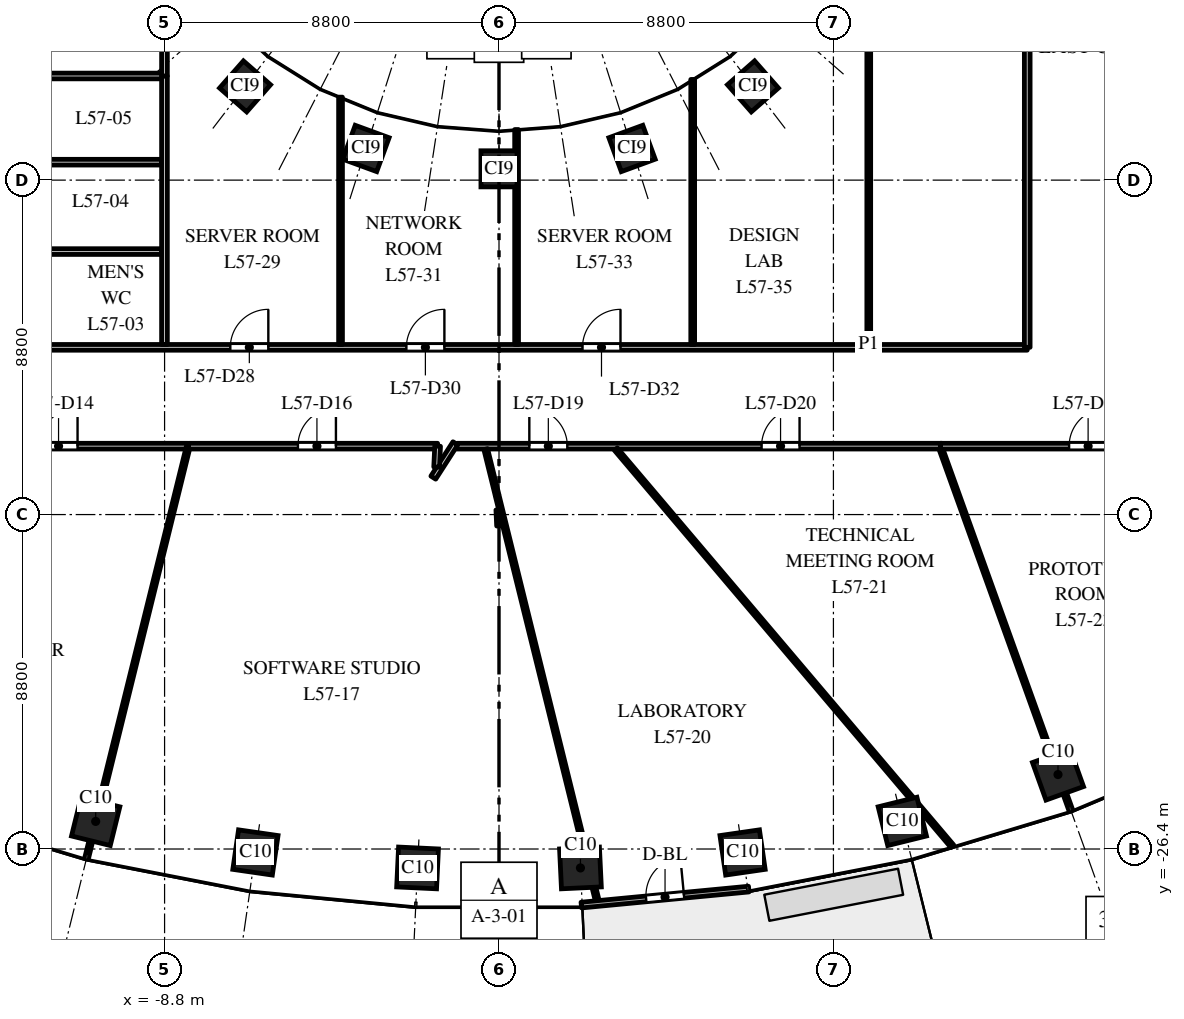
"""IFC4 building model, lengths in metres.
Left out: names, types, materials, properties, quantities, classifications, styles, units other than length and angle.
Written with IfcOpenShell. Run it as: python <this file> out.ifc"""

import sys

from ifc_helpers import new_model, si_unit, direction, frame, frame_2d, origin, origin_2d, place, context, subcontext, project, spatial, rectangle, extrude, element, fill, save


model = new_model("IFC4")
c1 = context("Model", 3, precision=1e-05, world=origin(), true_north=direction((0.0, 1.0)))
c2 = subcontext(c1, "Body", "Model", "MODEL_VIEW")
j1 = project(units=[si_unit("LENGTHUNIT", "METRE"), si_unit("PLANEANGLEUNIT", "RADIAN")], contexts=[c1])
p1 = place(None, origin())
s1 = spatial("IfcSite", under=j1, at=p1, CompositionType="ELEMENT")
p2 = place(p1, origin())
s2 = spatial("IfcBuilding", under=s1, at=p2, CompositionType="ELEMENT")
p3 = place(p2, frame((0.0, 0.0, 269.5)))
s3 = spatial("IfcBuildingStorey", under=s2, at=p3, CompositionType="ELEMENT", Elevation=269.5)
for number, where, z_axis, x_axis in (
    (1, (-10.613, -25.674, 0.0), (0.0, 0.0, 1.0), (0.971, -0.24, 0.0)),
    (2, (-6.409, -26.491, 0.0), (0.0, 0.0, 1.0), (0.99, -0.143, 0.0)),
    (3, (-2.143, -26.898, 0.0), (0.0, 0.0, 1.0), (0.999, -0.048, 0.0)),
    (4, (2.143, -26.898, 0.0), (0.0, 0.0, 1.0), (0.999, 0.048, 0.0)),
    (5, (6.409, -26.491, 0.0), (0.0, 0.0, 1.0), (0.99, 0.143, 0.0)),
    (6, (10.613, -25.674, 0.0), (0.0, 0.0, 1.0), (0.971, 0.24, 0.0)),
    (7, (14.709, -24.441, 0.0), (0.0, 0.0, 1.0), (0.941, 0.338, 0.0)),
):
    element("IfcColumn", number, at=place(p3, frame(where, z_axis=z_axis, x_axis=x_axis)), inside=s3, PredefinedType="COLUMN", context=c2, shape_type="SweptSolid", body=[
        extrude(rectangle(XDim=1.05, YDim=1.05, at=origin_2d()), origin(), (0.0, 0.0, 1.0), 4.0),
    ])
for number, where, z_axis, x_axis in (
    (8, (-6.682, -6.334, 0.0), (0.0, 0.0, 1.0), (0.751, -0.66, 0.0)),
    (9, (-3.501, -7.967, 0.0), (0.0, 0.0, 1.0), (0.939, -0.344, 0.0)),
    (10, (0.0, -8.503, 0.0), (0.0, 0.0, 1.0), (1.0, 0.0, 0.0)),
    (11, (3.501, -7.967, 0.0), (0.0, 0.0, 1.0), (0.939, 0.344, 0.0)),
    (12, (6.682, -6.334, 0.0), (0.0, 0.0, 1.0), (0.751, 0.66, 0.0)),
):
    element("IfcColumn", number, at=place(p3, frame(where, z_axis=z_axis, x_axis=x_axis)), inside=s3, PredefinedType="COLUMN", context=c2, shape_type="SweptSolid", body=[
        extrude(rectangle(XDim=0.95, YDim=0.95, at=origin_2d()), origin(), (0.0, 0.0, 1.0), 4.0),
    ])
p4 = place(p3, frame((2.166, -27.875, 0.0), z_axis=(0.0, 0.0, 1.0), x_axis=(0.995473879823, 0.095035543824, 0.0)))
e13 = element("IfcWall", 13, at=p4, inside=s3, PredefinedType="STANDARD", context=c2, shape_type="SweptSolid", body=[
    extrude(rectangle(XDim=4.426, YDim=0.15, at=frame_2d((2.213, 0.0))), origin(), (0.0, 0.0, 1.0), 3.7),
])
p5 = place(p4, frame((1.713, 0.0, 0.0)))
e14 = element("IfcOpeningElement", 14, at=p5, cuts=e13, PredefinedType="OPENING", context=c2, shape_type="SweptSolid", body=[
    extrude(rectangle(XDim=1.0, YDim=2.4, at=frame_2d((0.5, 1.2))), frame((0.0, 0.085, 0.0), z_axis=(0.0, -1.0, 0.0), x_axis=(1.0, 0.0, 0.0)), (0.0, 0.0, 1.0), 0.17),
])
p6 = place(p3, frame((-28.0, -15.8, 0.0), z_axis=(0.0, 0.0, 1.0), x_axis=(1.0, 0.0, 0.0)))
e15 = element("IfcWall", 15, at=p6, inside=s3, PredefinedType="PARTITIONING", context=c2, shape_type="SweptSolid", body=[
    extrude(rectangle(XDim=19.809, YDim=0.15, at=frame_2d((9.905, 0.0))), origin(), (0.0, 0.0, 1.0), 2.75),
])
p7 = place(p6, frame((7.878, 0.0, 0.0)))
e16 = element("IfcOpeningElement", 16, at=p7, cuts=e15, PredefinedType="OPENING", context=c2, shape_type="SweptSolid", body=[
    extrude(rectangle(XDim=1.0, YDim=2.1, at=frame_2d((0.5, 1.05))), frame((0.0, 0.085, 0.0), z_axis=(0.0, -1.0, 0.0), x_axis=(1.0, 0.0, 0.0)), (0.0, 0.0, 1.0), 0.17),
])
p8 = place(p6, frame((15.91, 0.0, 0.0)))
e17 = element("IfcOpeningElement", 17, at=p8, cuts=e15, PredefinedType="OPENING", context=c2, shape_type="SweptSolid", body=[
    extrude(rectangle(XDim=1.0, YDim=2.1, at=frame_2d((0.5, 1.05))), frame((0.0, 0.085, 0.0), z_axis=(0.0, -1.0, 0.0), x_axis=(1.0, 0.0, 0.0)), (0.0, 0.0, 1.0), 0.17),
])
p9 = place(p3, frame((-13.9, -13.2, 0.0), z_axis=(0.0, 0.0, 1.0), x_axis=(1.0, 0.0, 0.0)))
e18 = element("IfcWall", 18, at=p9, inside=s3, PredefinedType="PARTITIONING", context=c2, shape_type="SweptSolid", body=[
    extrude(rectangle(XDim=27.8, YDim=0.15, at=frame_2d((13.9, 0.0))), origin(), (0.0, 0.0, 1.0), 2.85),
])
p10 = place(p9, frame((6.83, 0.0, 0.0)))
e19 = element("IfcOpeningElement", 19, at=p10, cuts=e18, PredefinedType="OPENING", context=c2, shape_type="SweptSolid", body=[
    extrude(rectangle(XDim=1.0, YDim=2.1, at=frame_2d((0.5, 1.05))), frame((0.0, 0.085, 0.0), z_axis=(0.0, -1.0, 0.0), x_axis=(1.0, 0.0, 0.0)), (0.0, 0.0, 1.0), 0.17),
])
p11 = place(p9, frame((11.463, 0.0, 0.0)))
e20 = element("IfcOpeningElement", 20, at=p11, cuts=e18, PredefinedType="OPENING", context=c2, shape_type="SweptSolid", body=[
    extrude(rectangle(XDim=1.0, YDim=2.1, at=frame_2d((0.5, 1.05))), frame((0.0, 0.085, 0.0), z_axis=(0.0, -1.0, 0.0), x_axis=(1.0, 0.0, 0.0)), (0.0, 0.0, 1.0), 0.17),
])
p12 = place(p9, frame((16.097, 0.0, 0.0)))
e21 = element("IfcOpeningElement", 21, at=p12, cuts=e18, PredefinedType="OPENING", context=c2, shape_type="SweptSolid", body=[
    extrude(rectangle(XDim=1.0, YDim=2.1, at=frame_2d((0.5, 1.05))), frame((0.0, 0.085, 0.0), z_axis=(0.0, -1.0, 0.0), x_axis=(1.0, 0.0, 0.0)), (0.0, 0.0, 1.0), 0.17),
])
p13 = place(p3, frame((-11.925, -10.68, 0.0), z_axis=(0.0, 0.0, 1.0), x_axis=(1.0, 0.0, 0.0)))
e22 = element("IfcWall", 22, at=p13, inside=s3, PredefinedType="PARTITIONING", context=c2, shape_type="SweptSolid", body=[
    extrude(rectangle(XDim=3.047, YDim=0.15, at=frame_2d((1.523, 0.0))), origin(), (0.0, 0.0, 1.0), 3.7),
])
p14 = place(p3, frame((-11.925, -8.328, 0.0), z_axis=(0.0, 0.0, 1.0), x_axis=(1.0, 0.0, 0.0)))
e23 = element("IfcWall", 23, at=p14, inside=s3, PredefinedType="PARTITIONING", context=c2, shape_type="SweptSolid", body=[
    extrude(rectangle(XDim=3.047, YDim=0.15, at=frame_2d((1.523, 0.0))), origin(), (0.0, 0.0, 1.0), 2.75),
])
p15 = place(p3, frame((-12.0, -6.06, 0.0), z_axis=(0.0, 0.0, 1.0), x_axis=(1.0, 0.0, 0.0)))
e24 = element("IfcWall", 24, at=p15, inside=s3, PredefinedType="PARTITIONING", context=c2, shape_type="SweptSolid", body=[
    extrude(rectangle(XDim=3.197, YDim=0.15, at=frame_2d((1.599, 0.0))), origin(), (0.0, 0.0, 1.0), 3.7),
])
p16 = place(p3, frame((-10.853, -26.646, 0.0), z_axis=(0.0, 0.0, 1.0), x_axis=(0.239794021926, 0.970823787847, 0.0)))
e25 = element("IfcWall", 25, at=p16, inside=s3, PredefinedType="PARTITIONING", context=c2, shape_type="SweptSolid", body=[
    extrude(rectangle(XDim=11.172, YDim=0.1, at=frame_2d((5.586, 0.0))), origin(), (0.0, 0.0, 1.0), 2.85),
])
p17 = place(p3, frame((-8.803, -13.125, 0.0), z_axis=(0.0, 0.0, 1.0), x_axis=(0.0, 1.0, 0.0)))
e26 = element("IfcWall", 26, at=p17, inside=s3, PredefinedType="PARTITIONING", context=c2, shape_type="SweptSolid", body=[
    extrude(rectangle(XDim=7.065, YDim=0.15, at=frame_2d((3.532, 0.0))), origin(), (0.0, 0.0, 1.0), 2.75),
])
p18 = place(p3, frame((-8.803, -6.06, 0.0), z_axis=(0.0, 0.0, 1.0), x_axis=(0.0, 1.0, 0.0)))
e27 = element("IfcWall", 27, at=p18, inside=s3, PredefinedType="PARTITIONING", context=c2, shape_type="SweptSolid", body=[
    extrude(rectangle(XDim=1.26, YDim=0.15, at=frame_2d((0.63, 0.0))), origin(), (0.0, 0.0, 1.0), 3.7),
])
p19 = place(p3, frame((-8.174, -15.8, 0.0), z_axis=(0.0, 0.0, 1.0), x_axis=(1.0, 0.0, 0.0)))
e28 = element("IfcWall", 28, at=p19, inside=s3, PredefinedType="PARTITIONING", context=c2, shape_type="SweptSolid", body=[
    extrude(rectangle(XDim=6.559, YDim=0.15, at=frame_2d((3.28, 0.0))), origin(), (0.0, 0.0, 1.0), 2.85),
])
p20 = place(p19, frame((2.883, 0.0, 0.0)))
e29 = element("IfcOpeningElement", 29, at=p20, cuts=e28, PredefinedType="OPENING", context=c2, shape_type="SweptSolid", body=[
    extrude(rectangle(XDim=1.0, YDim=2.1, at=frame_2d((0.5, 1.05))), frame((0.0, 0.085, 0.0), z_axis=(0.0, -1.0, 0.0), x_axis=(1.0, 0.0, 0.0)), (0.0, 0.0, 1.0), 0.17),
])
p21 = place(p3, frame((-4.17, -13.125, 0.0), z_axis=(0.0, 0.0, 1.0), x_axis=(0.0, 1.0, 0.0)))
e30 = element("IfcWall", 30, at=p21, inside=s3, PredefinedType="PARTITIONING", context=c2, shape_type="SweptSolid", body=[
    extrude(rectangle(XDim=6.508, YDim=0.1, at=frame_2d((3.254, 0.0))), origin(), (0.0, 0.0, 1.0), 2.85),
])
p22 = place(p3, frame((-1.729, -16.628, 0.0), z_axis=(0.0, 0.0, 1.0), x_axis=(0.541194243454, 0.840897610207, 0.0)))
e31 = element("IfcWall", 31, at=p22, inside=s3, PredefinedType="PARTITIONING", context=c2, shape_type="SweptSolid", body=[
    extrude(rectangle(XDim=1.074, YDim=0.15, at=frame_2d((0.537, 0.0))), origin(), (0.0, 0.0, 1.0), 2.85),
])
p23 = place(p3, frame((-1.641, -16.352, 0.0), z_axis=(0.0, 0.0, 1.0), x_axis=(0.047271288541, 0.998882087776, 0.0)))
e32 = element("IfcWall", 32, at=p23, inside=s3, PredefinedType="PARTITIONING", context=c2, shape_type="SweptSolid", body=[
    extrude(rectangle(XDim=0.553, YDim=0.15, at=frame_2d((0.276, 0.0))), origin(), (0.0, 0.0, 1.0), 3.7),
])
p24 = place(p3, frame((-1.107, -15.8, 0.0), z_axis=(0.0, 0.0, 1.0), x_axis=(1.0, 0.0, 0.0)))
e33 = element("IfcWall", 33, at=p24, inside=s3, PredefinedType="PARTITIONING", context=c2, shape_type="SweptSolid", body=[
    extrude(rectangle(XDim=12.762, YDim=0.15, at=frame_2d((6.381, 0.0))), origin(), (0.0, 0.0, 1.0), 2.85),
])
p25 = place(p24, frame((1.905, 0.0, 0.0)))
e34 = element("IfcOpeningElement", 34, at=p25, cuts=e33, PredefinedType="OPENING", context=c2, shape_type="SweptSolid", body=[
    extrude(rectangle(XDim=1.0, YDim=2.1, at=frame_2d((0.5, 1.05))), frame((0.0, 0.085, 0.0), z_axis=(0.0, -1.0, 0.0), x_axis=(1.0, 0.0, 0.0)), (0.0, 0.0, 1.0), 0.17),
])
p26 = place(p24, frame((8.016, 0.0, 0.0)))
e35 = element("IfcOpeningElement", 35, at=p26, cuts=e33, PredefinedType="OPENING", context=c2, shape_type="SweptSolid", body=[
    extrude(rectangle(XDim=1.0, YDim=2.1, at=frame_2d((0.5, 1.05))), frame((0.0, 0.085, 0.0), z_axis=(0.0, -1.0, 0.0), x_axis=(1.0, 0.0, 0.0)), (0.0, 0.0, 1.0), 0.17),
])
p27 = place(p3, frame((-0.349, -15.879, 0.0), z_axis=(0.0, 0.0, 1.0), x_axis=(0.239974555355, -0.970779178177, 0.0)))
e36 = element("IfcWall", 36, at=p27, inside=s3, PredefinedType="PARTITIONING", context=c2, shape_type="SweptSolid", body=[
    extrude(rectangle(XDim=1.234, YDim=0.1, at=frame_2d((0.617, 0.0))), origin(), (0.0, 0.0, 1.0), 3.7),
])
p28 = place(p3, frame((-0.049, -17.097, 0.0), z_axis=(0.0, 0.0, 1.0), x_axis=(0.239793112589, -0.970824012453, 0.0)))
e37 = element("IfcWall", 37, at=p28, inside=s3, PredefinedType="PARTITIONING", context=c2, shape_type="SweptSolid", body=[
    extrude(rectangle(XDim=11.084, YDim=0.1, at=frame_2d((5.542, 0.0))), origin(), (0.0, 0.0, 1.0), 3.0),
])
p29 = place(p3, frame((-0.03, -17.477, 0.0), z_axis=(0.0, 0.0, 1.0), x_axis=(0.045092973364, -0.998982794523, 0.0)))
e38 = element("IfcWall", 38, at=p29, inside=s3, PredefinedType="PARTITIONING", context=c2, shape_type="SweptSolid", body=[
    extrude(rectangle(XDim=0.422, YDim=0.1, at=frame_2d((0.211, 0.0))), origin(), (0.0, 0.0, 1.0), 3.7),
])
p30 = place(p3, frame((0.463, -13.125, 0.0), z_axis=(0.0, 0.0, 1.0), x_axis=(0.0, 1.0, 0.0)))
e39 = element("IfcWall", 39, at=p30, inside=s3, PredefinedType="PARTITIONING", context=c2, shape_type="SweptSolid", body=[
    extrude(rectangle(XDim=5.656, YDim=0.1, at=frame_2d((2.828, 0.0))), origin(), (0.0, 0.0, 1.0), 3.0),
])
p31 = place(p3, frame((3.075, -15.878, 0.0), z_axis=(0.0, 0.0, 1.0), x_axis=(0.64645132614, -0.762955229966, 0.0)))
e40 = element("IfcWall", 40, at=p31, inside=s3, PredefinedType="PARTITIONING", context=c2, shape_type="SweptSolid", body=[
    extrude(rectangle(XDim=13.69, YDim=0.1, at=frame_2d((6.845, 0.0))), origin(), (0.0, 0.0, 1.0), 2.85),
])
p32 = place(p3, frame((5.097, -13.125, 0.0), z_axis=(0.0, 0.0, 1.0), x_axis=(0.0, 1.0, 0.0)))
e41 = element("IfcWall", 41, at=p32, inside=s3, PredefinedType="PARTITIONING", context=c2, shape_type="SweptSolid", body=[
    extrude(rectangle(XDim=6.974, YDim=0.1, at=frame_2d((3.487, 0.0))), origin(), (0.0, 0.0, 1.0), 2.85),
])
p33 = place(p3, frame((9.73, -13.125, 0.0), z_axis=(0.0, 0.0, 1.0), x_axis=(0.0, 1.0, 0.0)))
e42 = element("IfcWall", 42, at=p33, inside=s3, PredefinedType="PARTITIONING", context=c2, shape_type="SweptSolid", body=[
    extrude(rectangle(XDim=26.25, YDim=0.1, at=frame_2d((13.125, 0.0))), origin(), (0.0, 0.0, 1.0), 2.75),
])
p34 = place(p3, frame((11.629, -15.875, 0.0), z_axis=(0.0, 0.0, 1.0), x_axis=(0.338394316696, -0.94100440298, 0.0)))
e43 = element("IfcWall", 43, at=p34, inside=s3, PredefinedType="PARTITIONING", context=c2, shape_type="SweptSolid", body=[
    extrude(rectangle(XDim=10.104, YDim=0.1, at=frame_2d((5.052, 0.0))), origin(), (0.0, 0.0, 1.0), 2.85),
])
p35 = place(p3, frame((11.614, -15.8, 0.0), z_axis=(0.0, 0.0, 1.0), x_axis=(1.0, 0.0, 0.0)))
e44 = element("IfcWall", 44, at=p35, inside=s3, PredefinedType="PARTITIONING", context=c2, shape_type="SweptSolid", body=[
    extrude(rectangle(XDim=16.386, YDim=0.15, at=frame_2d((8.193, 0.0))), origin(), (0.0, 0.0, 1.0), 3.0),
])
p36 = place(p35, frame((3.388, 0.0, 0.0)))
e45 = element("IfcOpeningElement", 45, at=p36, cuts=e44, PredefinedType="OPENING", context=c2, shape_type="SweptSolid", body=[
    extrude(rectangle(XDim=1.0, YDim=2.1, at=frame_2d((0.5, 1.05))), frame((0.0, 0.085, 0.0), z_axis=(0.0, -1.0, 0.0), x_axis=(1.0, 0.0, 0.0)), (0.0, 0.0, 1.0), 0.17),
])
p37 = place(p35, frame((11.486, 0.0, 0.0)))
e46 = element("IfcOpeningElement", 46, at=p37, cuts=e44, PredefinedType="OPENING", context=c2, shape_type="SweptSolid", body=[
    extrude(rectangle(XDim=1.0, YDim=2.1, at=frame_2d((0.5, 1.05))), frame((0.0, 0.085, 0.0), z_axis=(0.0, -1.0, 0.0), x_axis=(1.0, 0.0, 0.0)), (0.0, 0.0, 1.0), 0.17),
])
p38 = place(p3, frame((13.9, -13.2, 0.0), z_axis=(0.0, 0.0, 1.0), x_axis=(0.0, 1.0, 0.0)))
e47 = element("IfcWall", 47, at=p38, inside=s3, PredefinedType="PARTITIONING", context=c2, shape_type="SweptSolid", body=[
    extrude(rectangle(XDim=26.4, YDim=0.15, at=frame_2d((13.2, 0.0))), origin(), (0.0, 0.0, 1.0), 2.75),
])
p39 = place(p38, frame((12.75, 0.0, 0.0)))
e48 = element("IfcOpeningElement", 48, at=p39, cuts=e47, PredefinedType="OPENING", context=c2, shape_type="SweptSolid", body=[
    extrude(rectangle(XDim=1.0, YDim=2.1, at=frame_2d((0.5, 1.05))), frame((0.0, 0.085, 0.0), z_axis=(0.0, -1.0, 0.0), x_axis=(1.0, 0.0, 0.0)), (0.0, 0.0, 1.0), 0.17),
])
p40 = place(p5, origin())
e49 = element("IfcDoor", 49, at=p40, inside=s3, OperationType="SINGLE_SWING_RIGHT", PredefinedType="DOOR", context=c2, shape_type="SweptSolid", body=[
    extrude(rectangle(XDim=1.0, YDim=2.4, at=frame_2d((0.5, 1.2))), frame((0.0, 0.025, 0.0), z_axis=(0.0, -1.0, 0.0), x_axis=(1.0, 0.0, 0.0)), (0.0, 0.0, 1.0), 0.05),
])
fill(e14, e49)
p41 = place(p8, origin())
e50 = element("IfcDoor", 50, at=p41, inside=s3, OperationType="SINGLE_SWING_RIGHT", PredefinedType="DOOR", context=c2, shape_type="SweptSolid", body=[
    extrude(rectangle(XDim=1.0, YDim=2.1, at=frame_2d((0.5, 1.05))), frame((0.0, 0.025, 0.0), z_axis=(0.0, -1.0, 0.0), x_axis=(1.0, 0.0, 0.0)), (0.0, 0.0, 1.0), 0.05),
])
fill(e17, e50)
p42 = place(p20, origin())
e51 = element("IfcDoor", 51, at=p42, inside=s3, OperationType="SINGLE_SWING_RIGHT", PredefinedType="DOOR", context=c2, shape_type="SweptSolid", body=[
    extrude(rectangle(XDim=1.0, YDim=2.1, at=frame_2d((0.5, 1.05))), frame((0.0, 0.025, 0.0), z_axis=(0.0, -1.0, 0.0), x_axis=(1.0, 0.0, 0.0)), (0.0, 0.0, 1.0), 0.05),
])
fill(e29, e51)
p43 = place(p25, origin())
e52 = element("IfcDoor", 52, at=p43, inside=s3, OperationType="SINGLE_SWING_LEFT", PredefinedType="DOOR", context=c2, shape_type="SweptSolid", body=[
    extrude(rectangle(XDim=1.0, YDim=2.1, at=frame_2d((0.5, 1.05))), frame((0.0, 0.025, 0.0), z_axis=(0.0, -1.0, 0.0), x_axis=(1.0, 0.0, 0.0)), (0.0, 0.0, 1.0), 0.05),
])
fill(e34, e52)
p44 = place(p26, origin())
e53 = element("IfcDoor", 53, at=p44, inside=s3, OperationType="SINGLE_SWING_RIGHT", PredefinedType="DOOR", context=c2, shape_type="SweptSolid", body=[
    extrude(rectangle(XDim=1.0, YDim=2.1, at=frame_2d((0.5, 1.05))), frame((0.0, 0.025, 0.0), z_axis=(0.0, -1.0, 0.0), x_axis=(1.0, 0.0, 0.0)), (0.0, 0.0, 1.0), 0.05),
])
fill(e35, e53)
p45 = place(p36, origin())
e54 = element("IfcDoor", 54, at=p45, inside=s3, OperationType="SINGLE_SWING_RIGHT", PredefinedType="DOOR", context=c2, shape_type="SweptSolid", body=[
    extrude(rectangle(XDim=1.0, YDim=2.1, at=frame_2d((0.5, 1.05))), frame((0.0, 0.025, 0.0), z_axis=(0.0, -1.0, 0.0), x_axis=(1.0, 0.0, 0.0)), (0.0, 0.0, 1.0), 0.05),
])
fill(e45, e54)
p46 = place(p10, origin())
e55 = element("IfcDoor", 55, at=p46, inside=s3, OperationType="SINGLE_SWING_RIGHT", PredefinedType="DOOR", context=c2, shape_type="SweptSolid", body=[
    extrude(rectangle(XDim=1.0, YDim=2.1, at=frame_2d((0.5, 1.05))), frame((0.0, 0.025, 0.0), z_axis=(0.0, -1.0, 0.0), x_axis=(1.0, 0.0, 0.0)), (0.0, 0.0, 1.0), 0.05),
])
fill(e19, e55)
p47 = place(p11, origin())
e56 = element("IfcDoor", 56, at=p47, inside=s3, OperationType="SINGLE_SWING_RIGHT", PredefinedType="DOOR", context=c2, shape_type="SweptSolid", body=[
    extrude(rectangle(XDim=1.0, YDim=2.1, at=frame_2d((0.5, 1.05))), frame((0.0, 0.025, 0.0), z_axis=(0.0, -1.0, 0.0), x_axis=(1.0, 0.0, 0.0)), (0.0, 0.0, 1.0), 0.05),
])
fill(e20, e56)
p48 = place(p12, origin())
e57 = element("IfcDoor", 57, at=p48, inside=s3, OperationType="SINGLE_SWING_RIGHT", PredefinedType="DOOR", context=c2, shape_type="SweptSolid", body=[
    extrude(rectangle(XDim=1.0, YDim=2.1, at=frame_2d((0.5, 1.05))), frame((0.0, 0.025, 0.0), z_axis=(0.0, -1.0, 0.0), x_axis=(1.0, 0.0, 0.0)), (0.0, 0.0, 1.0), 0.05),
])
fill(e21, e57)
save(model, sys.argv[1])
